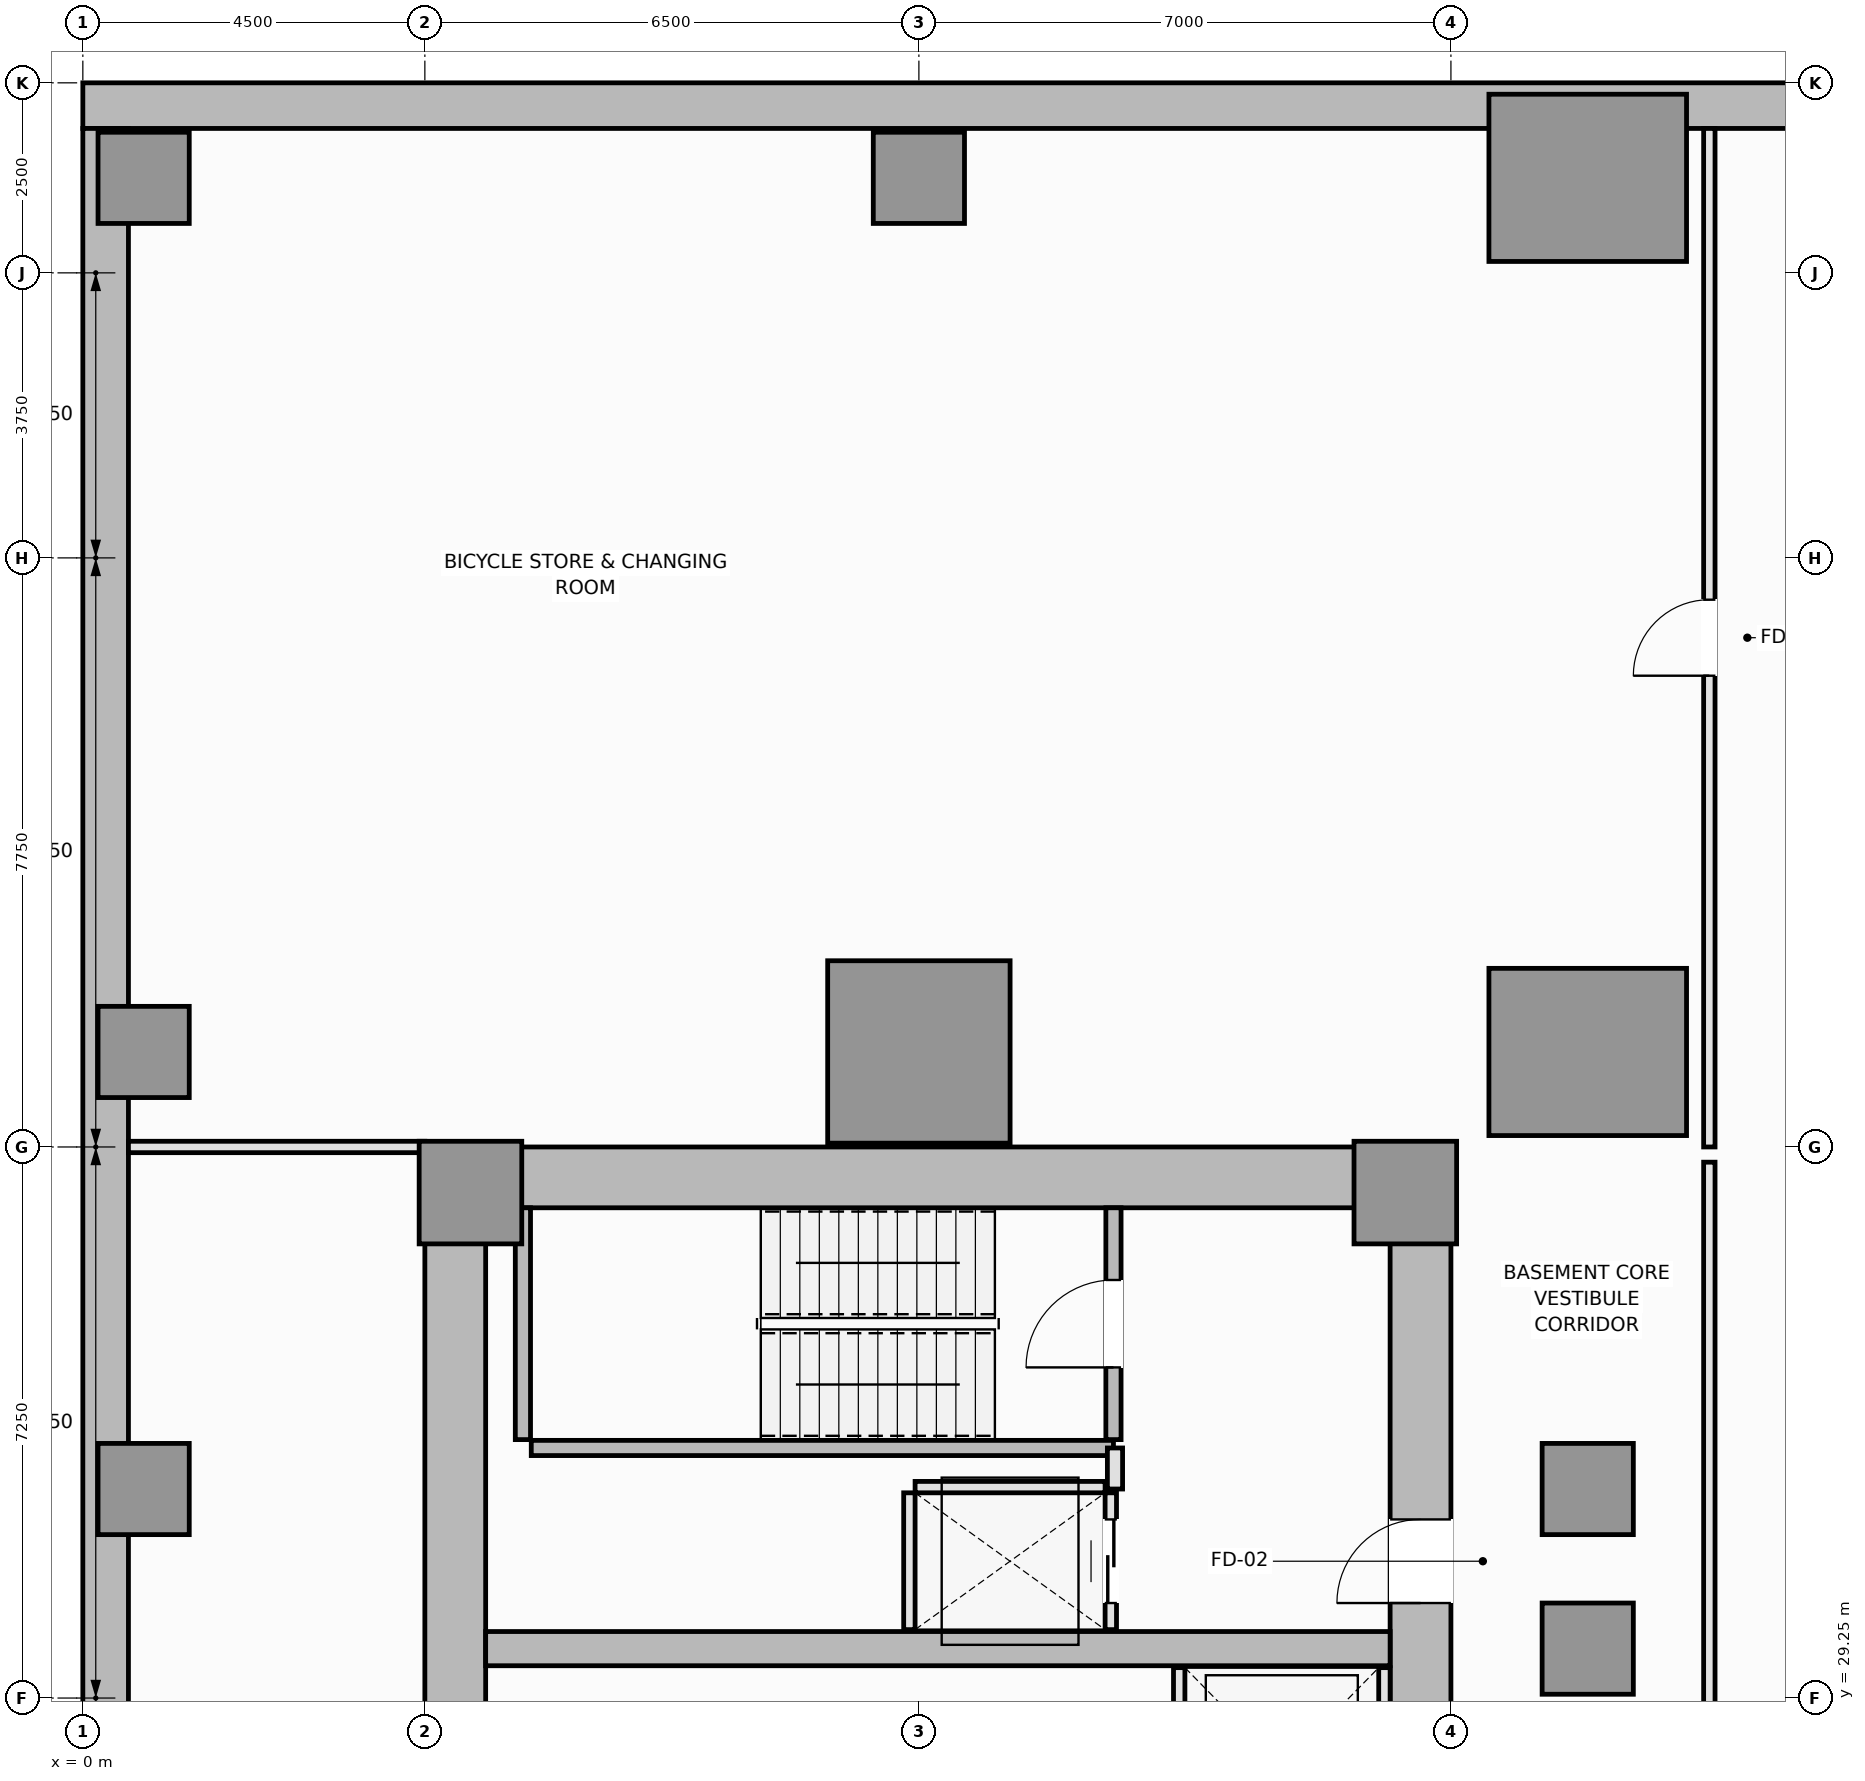
"""IFC4 building model, lengths in metres.
Left out: names, types, materials, properties, quantities, classifications, styles, units other than length and angle.
Written with IfcOpenShell. Run it as: python <this file> out.ifc"""

import sys

from ifc_helpers import new_model, si_unit, direction, frame, frame_2d, origin, origin_2d, place, context, subcontext, project, spatial, rectangle, extrude, element, fill, save


model = new_model("IFC4")
c1 = context("Model", 3, precision=1e-05, world=origin(), true_north=direction((0.0, 1.0)))
c2 = subcontext(c1, "Body", "Model", "MODEL_VIEW")
j1 = project(units=[si_unit("LENGTHUNIT", "METRE"), si_unit("PLANEANGLEUNIT", "RADIAN")], contexts=[c1])
p1 = place(None, origin())
s1 = spatial("IfcSite", under=j1, at=p1, CompositionType="ELEMENT")
p2 = place(p1, origin())
s2 = spatial("IfcBuilding", under=s1, at=p2, CompositionType="ELEMENT")
p3 = place(p2, frame((0.0, 0.0, -9.0)))
s3 = spatial("IfcBuildingStorey", under=s2, at=p3, CompositionType="ELEMENT", Elevation=-9.0)
p4 = place(p3, frame((0.0, 50.2, 0.0), z_axis=(0.0, 0.0, 1.0), x_axis=(1.0, 0.0, 0.0)))
e1 = element("IfcWall", 1, at=p4, inside=s3, PredefinedType="USERDEFINED", context=c2, shape_type="SweptSolid", body=[
    extrude(rectangle(XDim=58.0, YDim=0.6, at=frame_2d((29.0, 0.0))), origin(), (0.0, 0.0, 1.0), 4.2),
])
p5 = place(p3, frame((0.3, 0.6, 0.0), z_axis=(0.0, 0.0, 1.0), x_axis=(0.0, 1.0, 0.0)))
e2 = element("IfcWall", 2, at=p5, inside=s3, PredefinedType="USERDEFINED", context=c2, shape_type="SweptSolid", body=[
    extrude(rectangle(XDim=49.3, YDim=0.6, at=frame_2d((24.65, 0.0))), origin(), (0.0, 0.0, 1.0), 4.2),
])
p6 = place(p3, frame((4.5, 36.1, 0.0), z_axis=(0.0, 0.0, 1.0), x_axis=(1.0, 0.0, 0.0)))
e3 = element("IfcWall", 3, at=p6, inside=s3, PredefinedType="SHEAR", context=c2, shape_type="SweptSolid", body=[
    extrude(rectangle(XDim=13.5, YDim=0.8, at=frame_2d((6.75, 0.0))), origin(), (0.0, 0.0, 1.0), 4.2),
])
p7 = place(p3, frame((4.9, 14.8, 0.0), z_axis=(0.0, 0.0, 1.0), x_axis=(0.0, 1.0, 0.0)))
e4 = element("IfcWall", 4, at=p7, inside=s3, PredefinedType="SHEAR", context=c2, shape_type="SweptSolid", body=[
    extrude(rectangle(XDim=20.9, YDim=0.8, at=frame_2d((10.45, 0.0))), origin(), (0.0, 0.0, 1.0), 4.2),
])
p8 = place(p3, frame((17.6, 27.05, 0.0), z_axis=(0.0, 0.0, 1.0), x_axis=(0.0, 1.0, 0.0)))
e5 = element("IfcWall", 5, at=p8, inside=s3, PredefinedType="SHEAR", context=c2, shape_type="SweptSolid", body=[
    extrude(rectangle(XDim=8.65, YDim=0.8, at=frame_2d((4.325, 0.0))), origin(), (0.0, 0.0, 1.0), 4.2),
])
p9 = place(p8, frame((3.45, 0.0, 0.0)))
e6 = element("IfcOpeningElement", 6, at=p9, cuts=e5, PredefinedType="OPENING", context=c2, shape_type="SweptSolid", body=[
    extrude(rectangle(XDim=1.1, YDim=2.15, at=frame_2d((0.55, 1.075))), frame((0.0, 0.41, 0.0), z_axis=(0.0, -1.0, 0.0), x_axis=(1.0, 0.0, 0.0)), (0.0, 0.0, 1.0), 0.82),
])
p10 = place(p3, frame((5.3, 29.9, 0.0), z_axis=(0.0, 0.0, 1.0), x_axis=(1.0, 0.0, 0.0)))
e7 = element("IfcWall", 7, at=p10, inside=s3, PredefinedType="SHEAR", context=c2, shape_type="SweptSolid", body=[
    extrude(rectangle(XDim=11.9, YDim=0.45, at=frame_2d((5.95, 0.0))), origin(), (0.0, 0.0, 1.0), 4.2),
])
for number, where, z_axis, x_axis in (
    (8, (5.1, 35.9, 0.0), (0.0, 0.0, 1.0), (1.0, 0.0, 0.0)),
    (9, (17.4, 35.9, 0.0), (0.0, 0.0, 1.0), (1.0, 0.0, 0.0)),
):
    element("IfcColumn", number, at=place(p3, frame(where, z_axis=z_axis, x_axis=x_axis)), inside=s3, PredefinedType="PILASTER", context=c2, shape_type="SweptSolid", body=[
        extrude(rectangle(XDim=1.35, YDim=1.35, at=origin_2d()), origin(), (0.0, 0.0, 1.0), 4.2),
    ])
p11 = place(p3, frame((11.0, 37.75, 0.0), z_axis=(0.0, 0.0, 1.0), x_axis=(1.0, 0.0, 0.0)))
e10 = element("IfcColumn", 10, at=p11, inside=s3, PredefinedType="COLUMN", context=c2, shape_type="SweptSolid", body=[
    extrude(rectangle(XDim=2.4, YDim=2.4, at=origin_2d()), origin(), (0.0, 0.0, 1.0), 4.2),
])
for number, where, z_axis, x_axis in (
    (11, (19.8, 37.75, 0.0), (0.0, 0.0, 1.0), (1.0, 0.0, 0.0)),
    (12, (19.8, 49.25, 0.0), (0.0, 0.0, 1.0), (1.0, 0.0, 0.0)),
):
    element("IfcColumn", number, at=place(p3, frame(where, z_axis=z_axis, x_axis=x_axis)), inside=s3, PredefinedType="COLUMN", context=c2, shape_type="SweptSolid", body=[
        extrude(rectangle(XDim=2.6, YDim=2.2, at=origin_2d()), origin(), (0.0, 0.0, 1.0), 4.2),
    ])
for number, where, z_axis, x_axis in (
    (13, (19.8, 29.9, 0.0), (0.0, 0.0, 1.0), (1.0, 0.0, 0.0)),
    (14, (19.8, 32.0, 0.0), (0.0, 0.0, 1.0), (1.0, 0.0, 0.0)),
    (15, (0.8, 32.0, 0.0), (0.0, 0.0, 1.0), (1.0, 0.0, 0.0)),
    (16, (0.8, 37.75, 0.0), (0.0, 0.0, 1.0), (1.0, 0.0, 0.0)),
    (17, (0.8, 49.25, 0.0), (0.0, 0.0, 1.0), (1.0, 0.0, 0.0)),
    (18, (11.0, 49.25, 0.0), (0.0, 0.0, 1.0), (1.0, 0.0, 0.0)),
):
    element("IfcColumn", number, at=place(p3, frame(where, z_axis=z_axis, x_axis=x_axis)), inside=s3, PredefinedType="COLUMN", context=c2, shape_type="SweptSolid", body=[
        extrude(rectangle(XDim=1.2, YDim=1.2, at=origin_2d()), origin(), (0.0, 0.0, 1.0), 4.2),
    ])
p12 = place(p3, frame((5.79, 32.65, 0.0), z_axis=(0.0, 0.0, 1.0), x_axis=(0.0, 1.0, 0.0)))
e19 = element("IfcWall", 19, at=p12, inside=s3, PredefinedType="SOLIDWALL", context=c2, shape_type="SweptSolid", body=[
    extrude(rectangle(XDim=3.05, YDim=0.2, at=frame_2d((1.525, 0.0))), origin(), (0.0, 0.0, 1.0), 4.2),
])
p13 = place(p3, frame((5.9, 32.54, 0.0), z_axis=(0.0, 0.0, 1.0), x_axis=(1.0, 0.0, 0.0)))
e20 = element("IfcWall", 20, at=p13, inside=s3, PredefinedType="SOLIDWALL", context=c2, shape_type="SweptSolid", body=[
    extrude(rectangle(XDim=7.66, YDim=0.2, at=frame_2d((3.83, 0.0))), origin(), (0.0, 0.0, 1.0), 4.2),
])
p14 = place(p3, frame((13.56, 32.65, 0.0), z_axis=(0.0, 0.0, 1.0), x_axis=(0.0, 1.0, 0.0)))
e21 = element("IfcWall", 21, at=p14, inside=s3, PredefinedType="SOLIDWALL", context=c2, shape_type="SweptSolid", body=[
    extrude(rectangle(XDim=3.05, YDim=0.2, at=frame_2d((1.525, 0.0))), origin(), (0.0, 0.0, 1.0), 4.2),
])
p15 = place(p14, frame((0.95, 0.0, 0.0)))
e22 = element("IfcOpeningElement", 22, at=p15, cuts=e21, PredefinedType="OPENING", context=c2, shape_type="SweptSolid", body=[
    extrude(rectangle(XDim=1.15, YDim=2.15, at=frame_2d((0.575, 1.075))), frame((0.0, 0.11, 0.0), z_axis=(0.0, -1.0, 0.0), x_axis=(1.0, 0.0, 0.0)), (0.0, 0.0, 1.0), 0.22),
])
for number, where, z_axis, x_axis in (
    (23, (14.425, 27.05, 0.0), (0.0, 0.0, 1.0), (0.0, 1.0, 0.0)),
    (24, (17.125, 27.05, 0.0), (0.0, 0.0, 1.0), (0.0, 1.0, 0.0)),
):
    element("IfcWall", number, at=place(p3, frame(where, z_axis=z_axis, x_axis=x_axis)), inside=s3, PredefinedType="PARTITIONING", context=c2, shape_type="SweptSolid", body=[
        extrude(rectangle(XDim=2.6, YDim=0.15, at=frame_2d((1.3, 0.0))), origin(), (0.0, 0.0, 1.0), 4.0),
    ])
p16 = place(p3, frame((10.95, 32.025, 0.0), z_axis=(0.0, 0.0, 1.0), x_axis=(1.0, 0.0, 0.0)))
e25 = element("IfcWall", 25, at=p16, inside=s3, PredefinedType="PARTITIONING", context=c2, shape_type="SweptSolid", body=[
    extrude(rectangle(XDim=2.5, YDim=0.15, at=frame_2d((1.25, 0.0))), origin(), (0.0, 0.0, 1.0), 4.0),
])
p17 = place(p3, frame((10.875, 30.15, 0.0), z_axis=(0.0, 0.0, 1.0), x_axis=(0.0, 1.0, 0.0)))
e26 = element("IfcWall", 26, at=p17, inside=s3, PredefinedType="PARTITIONING", context=c2, shape_type="SweptSolid", body=[
    extrude(rectangle(XDim=1.8, YDim=0.15, at=frame_2d((0.9, 0.0))), origin(), (0.0, 0.0, 1.0), 4.0),
])
p18 = place(p3, frame((13.525, 30.15, 0.0), z_axis=(0.0, 0.0, 1.0), x_axis=(0.0, 1.0, 0.0)))
e27 = element("IfcWall", 27, at=p18, inside=s3, PredefinedType="PARTITIONING", context=c2, shape_type="SweptSolid", body=[
    extrude(rectangle(XDim=1.8, YDim=0.15, at=frame_2d((0.9, 0.0))), origin(), (0.0, 0.0, 1.0), 4.0),
])
p19 = place(p18, frame((0.35, 0.0, 0.0)))
e28 = element("IfcOpeningElement", 28, at=p19, cuts=e27, PredefinedType="OPENING", context=c2, shape_type="SweptSolid", body=[
    extrude(rectangle(XDim=1.1, YDim=2.2, at=frame_2d((0.55, 1.1))), frame((0.0, 0.085, 0.0), z_axis=(0.0, -1.0, 0.0), x_axis=(1.0, 0.0, 0.0)), (0.0, 0.0, 1.0), 0.17),
])
p20 = place(p3, frame((13.58, 32.0, 0.0), z_axis=(0.0, 0.0, 1.0), x_axis=(0.0, 1.0, 0.0)))
e29 = element("IfcWall", 29, at=p20, inside=s3, PredefinedType="PARTITIONING", context=c2, shape_type="SweptSolid", body=[
    extrude(rectangle(XDim=0.54, YDim=0.2, at=frame_2d((0.27, 0.0))), origin(), (0.0, 0.0, 1.0), 4.0),
])
p21 = place(p3, frame((21.4, 14.2, 0.0), z_axis=(0.0, 0.0, 1.0), x_axis=(0.0, 1.0, 0.0)))
e30 = element("IfcWall", 30, at=p21, inside=s3, PredefinedType="PARTITIONING", context=c2, shape_type="SweptSolid", body=[
    extrude(rectangle(XDim=22.1, YDim=0.15, at=frame_2d((11.05, 0.0))), origin(), (0.0, 0.0, 1.0), 4.0),
])
p22 = place(p21, frame((10.55, 0.0, 0.0)))
e31 = element("IfcOpeningElement", 31, at=p22, cuts=e30, PredefinedType="OPENING", context=c2, shape_type="SweptSolid", body=[
    extrude(rectangle(XDim=1.0, YDim=2.15, at=frame_2d((0.5, 1.075))), frame((0.0, 0.085, 0.0), z_axis=(0.0, -1.0, 0.0), x_axis=(1.0, 0.0, 0.0)), (0.0, 0.0, 1.0), 0.17),
])
p23 = place(p3, frame((0.6, 36.5, 0.0), z_axis=(0.0, 0.0, 1.0), x_axis=(1.0, 0.0, 0.0)))
e32 = element("IfcWall", 32, at=p23, inside=s3, PredefinedType="PARTITIONING", context=c2, shape_type="SweptSolid", body=[
    extrude(rectangle(XDim=3.9, YDim=0.15, at=frame_2d((1.95, 0.0))), origin(), (0.0, 0.0, 1.0), 4.0),
])
p24 = place(p3, frame((21.4, 36.5, 0.0), z_axis=(0.0, 0.0, 1.0), x_axis=(0.0, 1.0, 0.0)))
e33 = element("IfcWall", 33, at=p24, inside=s3, PredefinedType="PARTITIONING", context=c2, shape_type="SweptSolid", body=[
    extrude(rectangle(XDim=13.4, YDim=0.15, at=frame_2d((6.7, 0.0))), origin(), (0.0, 0.0, 1.0), 4.0),
])
p25 = place(p24, frame((6.2, 0.0, 0.0)))
e34 = element("IfcOpeningElement", 34, at=p25, cuts=e33, PredefinedType="OPENING", context=c2, shape_type="SweptSolid", body=[
    extrude(rectangle(XDim=1.0, YDim=2.15, at=frame_2d((0.5, 1.075))), frame((0.0, 0.085, 0.0), z_axis=(0.0, -1.0, 0.0), x_axis=(1.0, 0.0, 0.0)), (0.0, 0.0, 1.0), 0.17),
])
p26 = place(p15, origin())
e35 = element("IfcDoor", 35, at=p26, inside=s3, OperationType="SINGLE_SWING_LEFT", PredefinedType="DOOR", context=c2, shape_type="SweptSolid", body=[
    extrude(rectangle(XDim=1.15, YDim=2.15, at=frame_2d((0.575, 1.075))), frame((0.0, 0.025, 0.0), z_axis=(0.0, -1.0, 0.0), x_axis=(1.0, 0.0, 0.0)), (0.0, 0.0, 1.0), 0.05),
])
fill(e22, e35)
p27 = place(p19, origin())
e36 = element("IfcDoor", 36, at=p27, inside=s3, OperationType="DOUBLE_DOOR_SLIDING", PredefinedType="DOOR", context=c2, shape_type="SweptSolid", body=[
    extrude(rectangle(XDim=1.1, YDim=2.2, at=frame_2d((0.55, 1.1))), frame((0.0, 0.025, 0.0), z_axis=(0.0, -1.0, 0.0), x_axis=(1.0, 0.0, 0.0)), (0.0, 0.0, 1.0), 0.05),
])
fill(e28, e36)
p28 = place(p9, origin())
e37 = element("IfcDoor", 37, at=p28, inside=s3, OperationType="SINGLE_SWING_LEFT", PredefinedType="DOOR", context=c2, shape_type="SweptSolid", body=[
    extrude(rectangle(XDim=1.1, YDim=2.15, at=frame_2d((0.55, 1.075))), frame((0.0, 0.025, 0.0), z_axis=(0.0, -1.0, 0.0), x_axis=(1.0, 0.0, 0.0)), (0.0, 0.0, 1.0), 0.05),
])
fill(e6, e37)
p29 = place(p25, origin())
e38 = element("IfcDoor", 38, at=p29, inside=s3, OperationType="SINGLE_SWING_LEFT", PredefinedType="DOOR", context=c2, shape_type="SweptSolid", body=[
    extrude(rectangle(XDim=1.0, YDim=2.15, at=frame_2d((0.5, 1.075))), frame((0.0, 0.025, 0.0), z_axis=(0.0, -1.0, 0.0), x_axis=(1.0, 0.0, 0.0)), (0.0, 0.0, 1.0), 0.05),
])
fill(e34, e38)
save(model, sys.argv[1])
